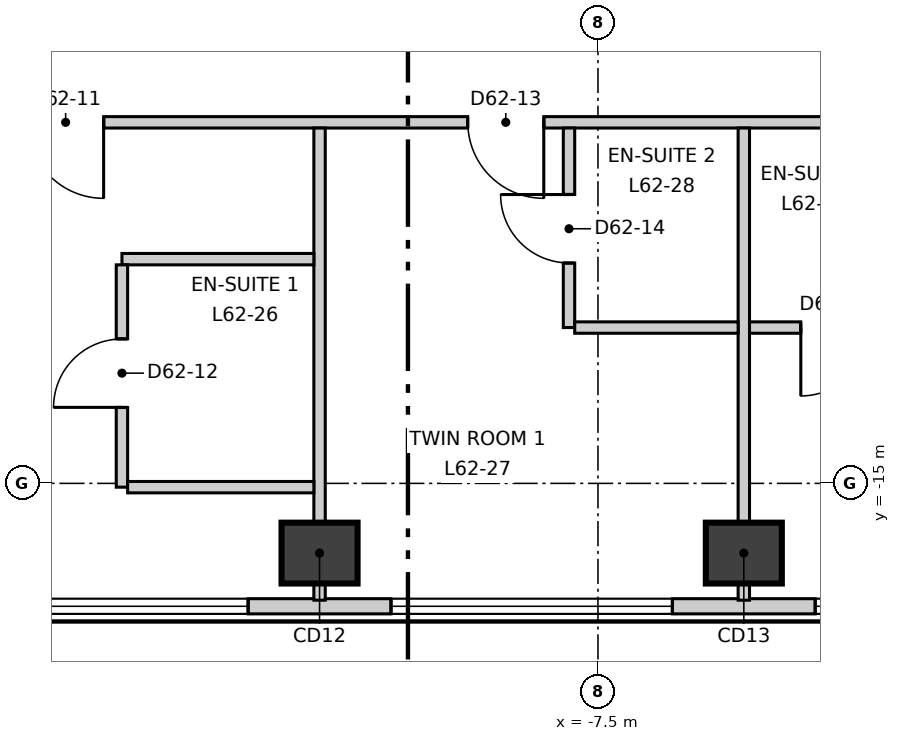
"""IFC4 building model, lengths in metres.
Left out: names, types, materials, properties, quantities, classifications, styles, units other than length and angle.
Written with IfcOpenShell. Run it as: python <this file> out.ifc"""

import sys

from ifc_helpers import new_model, si_unit, direction, frame, frame_2d, origin, origin_2d, place, context, subcontext, project, spatial, rectangle, extrude, element, fill, save


model = new_model("IFC4")
c1 = context("Model", 3, precision=1e-05, world=origin(), true_north=direction((0.0, 1.0)))
c2 = subcontext(c1, "Body", "Model", "MODEL_VIEW")
j1 = project(units=[si_unit("LENGTHUNIT", "METRE"), si_unit("PLANEANGLEUNIT", "RADIAN")], contexts=[c1])
p1 = place(None, origin())
s1 = spatial("IfcSite", under=j1, at=p1, CompositionType="ELEMENT")
p2 = place(p1, origin())
s2 = spatial("IfcBuilding", under=s1, at=p2, CompositionType="ELEMENT")
p3 = place(p2, frame((0.0, 0.0, 268.3)))
s3 = spatial("IfcBuildingStorey", under=s2, at=p3, CompositionType="ELEMENT", Elevation=268.3)
for number, where, z_axis, x_axis in (
    (1, (-11.163, -15.917, -0.3), (0.0, 0.0, 1.0), (1.0, 0.0, 0.0)),
    (2, (-5.581, -15.917, -0.3), (0.0, 0.0, 1.0), (1.0, 0.0, 0.0)),
):
    element("IfcColumn", number, at=place(p3, frame(where, z_axis=z_axis, x_axis=x_axis)), inside=s3, PredefinedType="COLUMN", context=c2, shape_type="SweptSolid", body=[
        extrude(rectangle(XDim=1.0, YDim=0.8, at=origin_2d()), origin(), (0.0, 0.0, 1.0), 3.6),
    ])
p4 = place(p3, frame((-2.577, 28.771, 0.0), z_axis=(0.0, 0.0, 1.0), x_axis=(-0.49999909388, -0.866025926932, 0.0)))
e3 = element("IfcWall", 3, at=p4, inside=s3, PredefinedType="ELEMENTEDWALL", context=c2, shape_type="SweptSolid", body=[
    extrude(rectangle(XDim=47.236, YDim=0.2, at=frame_2d((23.618, 0.0))), origin(), (0.0, 0.0, 1.0), 3.3),
])
p5 = place(p4, frame((2.243, 0.0, 0.9)))
e4 = element("IfcOpeningElement", 4, at=p5, cuts=e3, PredefinedType="OPENING", context=c2, shape_type="SweptSolid", body=[
    extrude(rectangle(XDim=3.7, YDim=2.2, at=frame_2d((1.85, 1.1))), frame((0.0, 0.11, 0.0), z_axis=(0.0, -1.0, 0.0), x_axis=(1.0, 0.0, 0.0)), (0.0, 0.0, 1.0), 0.22),
])
p6 = place(p4, frame((7.824, 0.0, 0.9)))
e5 = element("IfcOpeningElement", 5, at=p6, cuts=e3, PredefinedType="OPENING", context=c2, shape_type="SweptSolid", body=[
    extrude(rectangle(XDim=3.7, YDim=2.2, at=frame_2d((1.85, 1.1))), frame((0.0, 0.11, 0.0), z_axis=(0.0, -1.0, 0.0), x_axis=(1.0, 0.0, 0.0)), (0.0, 0.0, 1.0), 0.22),
])
p7 = place(p4, frame((13.406, 0.0, 0.9)))
e6 = element("IfcOpeningElement", 6, at=p7, cuts=e3, PredefinedType="OPENING", context=c2, shape_type="SweptSolid", body=[
    extrude(rectangle(XDim=3.7, YDim=2.2, at=frame_2d((1.85, 1.1))), frame((0.0, 0.11, 0.0), z_axis=(0.0, -1.0, 0.0), x_axis=(1.0, 0.0, 0.0)), (0.0, 0.0, 1.0), 0.22),
])
p8 = place(p4, frame((18.987, 0.0, 0.9)))
e7 = element("IfcOpeningElement", 7, at=p8, cuts=e3, PredefinedType="OPENING", context=c2, shape_type="SweptSolid", body=[
    extrude(rectangle(XDim=3.7, YDim=2.2, at=frame_2d((1.85, 1.1))), frame((0.0, 0.11, 0.0), z_axis=(0.0, -1.0, 0.0), x_axis=(1.0, 0.0, 0.0)), (0.0, 0.0, 1.0), 0.22),
])
p9 = place(p4, frame((24.569, 0.0, 0.9)))
e8 = element("IfcOpeningElement", 8, at=p9, cuts=e3, PredefinedType="OPENING", context=c2, shape_type="SweptSolid", body=[
    extrude(rectangle(XDim=3.7, YDim=2.2, at=frame_2d((1.85, 1.1))), frame((0.0, 0.11, 0.0), z_axis=(0.0, -1.0, 0.0), x_axis=(1.0, 0.0, 0.0)), (0.0, 0.0, 1.0), 0.22),
])
p10 = place(p4, frame((30.15, 0.0, 0.9)))
e9 = element("IfcOpeningElement", 9, at=p10, cuts=e3, PredefinedType="OPENING", context=c2, shape_type="SweptSolid", body=[
    extrude(rectangle(XDim=3.7, YDim=2.2, at=frame_2d((1.85, 1.1))), frame((0.0, 0.11, 0.0), z_axis=(0.0, -1.0, 0.0), x_axis=(1.0, 0.0, 0.0)), (0.0, 0.0, 1.0), 0.22),
])
p11 = place(p4, frame((35.731, 0.0, 0.9)))
e10 = element("IfcOpeningElement", 10, at=p11, cuts=e3, PredefinedType="OPENING", context=c2, shape_type="SweptSolid", body=[
    extrude(rectangle(XDim=3.7, YDim=2.2, at=frame_2d((1.85, 1.1))), frame((0.0, 0.11, 0.0), z_axis=(0.0, -1.0, 0.0), x_axis=(1.0, 0.0, 0.0)), (0.0, 0.0, 1.0), 0.22),
])
p12 = place(p4, frame((41.313, 0.0, 0.9)))
e11 = element("IfcOpeningElement", 11, at=p12, cuts=e3, PredefinedType="OPENING", context=c2, shape_type="SweptSolid", body=[
    extrude(rectangle(XDim=3.7, YDim=2.2, at=frame_2d((1.85, 1.1))), frame((0.0, 0.11, 0.0), z_axis=(0.0, -1.0, 0.0), x_axis=(1.0, 0.0, 0.0)), (0.0, 0.0, 1.0), 0.22),
])
p13 = place(p3, frame((-23.629, -16.617, 0.0), z_axis=(0.0, 0.0, 1.0), x_axis=(1.0, 0.0, 0.0)))
e12 = element("IfcWall", 12, at=p13, inside=s3, PredefinedType="ELEMENTEDWALL", context=c2, shape_type="SweptSolid", body=[
    extrude(rectangle(XDim=47.238, YDim=0.2, at=frame_2d((23.619, 0.0))), origin(), (0.0, 0.0, 1.0), 3.3),
])
p14 = place(p13, frame((2.244, 0.0, 0.9)))
e13 = element("IfcOpeningElement", 13, at=p14, cuts=e12, PredefinedType="OPENING", context=c2, shape_type="SweptSolid", body=[
    extrude(rectangle(XDim=3.7, YDim=2.2, at=frame_2d((1.85, 1.1))), frame((0.0, 0.11, 0.0), z_axis=(0.0, -1.0, 0.0), x_axis=(1.0, 0.0, 0.0)), (0.0, 0.0, 1.0), 0.22),
])
p15 = place(p13, frame((7.825, 0.0, 0.9)))
e14 = element("IfcOpeningElement", 14, at=p15, cuts=e12, PredefinedType="OPENING", context=c2, shape_type="SweptSolid", body=[
    extrude(rectangle(XDim=3.7, YDim=2.2, at=frame_2d((1.85, 1.1))), frame((0.0, 0.11, 0.0), z_axis=(0.0, -1.0, 0.0), x_axis=(1.0, 0.0, 0.0)), (0.0, 0.0, 1.0), 0.22),
])
p16 = place(p13, frame((13.407, 0.0, 0.9)))
e15 = element("IfcOpeningElement", 15, at=p16, cuts=e12, PredefinedType="OPENING", context=c2, shape_type="SweptSolid", body=[
    extrude(rectangle(XDim=3.7, YDim=2.2, at=frame_2d((1.85, 1.1))), frame((0.0, 0.11, 0.0), z_axis=(0.0, -1.0, 0.0), x_axis=(1.0, 0.0, 0.0)), (0.0, 0.0, 1.0), 0.22),
])
p17 = place(p13, frame((18.988, 0.0, 0.9)))
e16 = element("IfcOpeningElement", 16, at=p17, cuts=e12, PredefinedType="OPENING", context=c2, shape_type="SweptSolid", body=[
    extrude(rectangle(XDim=3.7, YDim=2.2, at=frame_2d((1.85, 1.1))), frame((0.0, 0.11, 0.0), z_axis=(0.0, -1.0, 0.0), x_axis=(1.0, 0.0, 0.0)), (0.0, 0.0, 1.0), 0.22),
])
p18 = place(p13, frame((24.57, 0.0, 0.9)))
e17 = element("IfcOpeningElement", 17, at=p18, cuts=e12, PredefinedType="OPENING", context=c2, shape_type="SweptSolid", body=[
    extrude(rectangle(XDim=3.7, YDim=2.2, at=frame_2d((1.85, 1.1))), frame((0.0, 0.11, 0.0), z_axis=(0.0, -1.0, 0.0), x_axis=(1.0, 0.0, 0.0)), (0.0, 0.0, 1.0), 0.22),
])
p19 = place(p13, frame((30.151, 0.0, 0.9)))
e18 = element("IfcOpeningElement", 18, at=p19, cuts=e12, PredefinedType="OPENING", context=c2, shape_type="SweptSolid", body=[
    extrude(rectangle(XDim=3.7, YDim=2.2, at=frame_2d((1.85, 1.1))), frame((0.0, 0.11, 0.0), z_axis=(0.0, -1.0, 0.0), x_axis=(1.0, 0.0, 0.0)), (0.0, 0.0, 1.0), 0.22),
])
p20 = place(p13, frame((35.733, 0.0, 0.9)))
e19 = element("IfcOpeningElement", 19, at=p20, cuts=e12, PredefinedType="OPENING", context=c2, shape_type="SweptSolid", body=[
    extrude(rectangle(XDim=3.7, YDim=2.2, at=frame_2d((1.85, 1.1))), frame((0.0, 0.11, 0.0), z_axis=(0.0, -1.0, 0.0), x_axis=(1.0, 0.0, 0.0)), (0.0, 0.0, 1.0), 0.22),
])
p21 = place(p13, frame((41.314, 0.0, 0.9)))
e20 = element("IfcOpeningElement", 20, at=p21, cuts=e12, PredefinedType="OPENING", context=c2, shape_type="SweptSolid", body=[
    extrude(rectangle(XDim=3.7, YDim=2.2, at=frame_2d((1.85, 1.1))), frame((0.0, 0.11, 0.0), z_axis=(0.0, -1.0, 0.0), x_axis=(1.0, 0.0, 0.0)), (0.0, 0.0, 1.0), 0.22),
])
p22 = place(p3, frame((-17.678, -10.12, 0.0), z_axis=(0.0, 0.0, 1.0), x_axis=(0.49998824015, 0.86603219323, 0.0)))
e21 = element("IfcWall", 21, at=p22, inside=s3, PredefinedType="PARTITIONING", context=c2, shape_type="SweptSolid", body=[
    extrude(rectangle(XDim=35.357, YDim=0.15, at=frame_2d((17.678, 0.0))), origin(), (0.0, 0.0, 1.0), 3.3),
])
p23 = place(p22, frame((31.607, 0.0, 0.0)))
e22 = element("IfcOpeningElement", 22, at=p23, cuts=e21, PredefinedType="OPENING", context=c2, shape_type="SweptSolid", body=[
    extrude(rectangle(XDim=1.0, YDim=2.1, at=frame_2d((0.5, 1.05))), frame((0.0, 0.085, 0.0), z_axis=(0.0, -1.0, 0.0), x_axis=(1.0, 0.0, 0.0)), (0.0, 0.0, 1.0), 0.17),
])
p24 = place(p22, frame((19.416, 0.0, 0.0)))
e23 = element("IfcOpeningElement", 23, at=p24, cuts=e21, PredefinedType="OPENING", context=c2, shape_type="SweptSolid", body=[
    extrude(rectangle(XDim=1.0, YDim=2.1, at=frame_2d((0.5, 1.05))), frame((0.0, 0.085, 0.0), z_axis=(0.0, -1.0, 0.0), x_axis=(1.0, 0.0, 0.0)), (0.0, 0.0, 1.0), 0.17),
])
p25 = place(p22, frame((24.916, 0.0, 0.0)))
e24 = element("IfcOpeningElement", 24, at=p25, cuts=e21, PredefinedType="OPENING", context=c2, shape_type="SweptSolid", body=[
    extrude(rectangle(XDim=0.9, YDim=2.1, at=frame_2d((0.45, 1.05))), frame((0.0, 0.085, 0.0), z_axis=(0.0, -1.0, 0.0), x_axis=(1.0, 0.0, 0.0)), (0.0, 0.0, 1.0), 0.17),
])
p26 = place(p22, frame((22.816, 0.0, 0.0)))
e25 = element("IfcOpeningElement", 25, at=p26, cuts=e21, PredefinedType="OPENING", context=c2, shape_type="SweptSolid", body=[
    extrude(rectangle(XDim=0.9, YDim=2.1, at=frame_2d((0.45, 1.05))), frame((0.0, 0.085, 0.0), z_axis=(0.0, -1.0, 0.0), x_axis=(1.0, 0.0, 0.0)), (0.0, 0.0, 1.0), 0.17),
])
p27 = place(p22, frame((14.654, 0.0, 0.0)))
e26 = element("IfcOpeningElement", 26, at=p27, cuts=e21, PredefinedType="OPENING", context=c2, shape_type="SweptSolid", body=[
    extrude(rectangle(XDim=1.0, YDim=2.1, at=frame_2d((0.5, 1.05))), frame((0.0, 0.085, 0.0), z_axis=(0.0, -1.0, 0.0), x_axis=(1.0, 0.0, 0.0)), (0.0, 0.0, 1.0), 0.17),
])
p28 = place(p22, frame((7.672, 0.0, 0.0)))
e27 = element("IfcOpeningElement", 27, at=p28, cuts=e21, PredefinedType="OPENING", context=c2, shape_type="SweptSolid", body=[
    extrude(rectangle(XDim=1.0, YDim=2.1, at=frame_2d((0.5, 1.05))), frame((0.0, 0.085, 0.0), z_axis=(0.0, -1.0, 0.0), x_axis=(1.0, 0.0, 0.0)), (0.0, 0.0, 1.0), 0.17),
])
p29 = place(p22, frame((2.69, 0.0, 0.0)))
e28 = element("IfcOpeningElement", 28, at=p29, cuts=e21, PredefinedType="OPENING", context=c2, shape_type="SweptSolid", body=[
    extrude(rectangle(XDim=1.0, YDim=2.1, at=frame_2d((0.5, 1.05))), frame((0.0, 0.085, 0.0), z_axis=(0.0, -1.0, 0.0), x_axis=(1.0, 0.0, 0.0)), (0.0, 0.0, 1.0), 0.17),
])
p30 = place(p3, frame((-17.604, -10.25, 0.0), z_axis=(0.0, 0.0, 1.0), x_axis=(1.0, 0.0, 0.0)))
e29 = element("IfcWall", 29, at=p30, inside=s3, PredefinedType="PARTITIONING", context=c2, shape_type="SweptSolid", body=[
    extrude(rectangle(XDim=35.358, YDim=0.15, at=frame_2d((17.679, 0.0))), origin(), (0.0, 0.0, 1.0), 3.3),
])
p31 = place(p30, frame((2.6, 0.0, 0.0)))
e30 = element("IfcOpeningElement", 30, at=p31, cuts=e29, PredefinedType="OPENING", context=c2, shape_type="SweptSolid", body=[
    extrude(rectangle(XDim=1.0, YDim=2.1, at=frame_2d((0.5, 1.05))), frame((0.0, 0.085, 0.0), z_axis=(0.0, -1.0, 0.0), x_axis=(1.0, 0.0, 0.0)), (0.0, 0.0, 1.0), 0.17),
])
p32 = place(p30, frame((8.391, 0.0, 0.0)))
e31 = element("IfcOpeningElement", 31, at=p32, cuts=e29, PredefinedType="OPENING", context=c2, shape_type="SweptSolid", body=[
    extrude(rectangle(XDim=1.0, YDim=2.1, at=frame_2d((0.5, 1.05))), frame((0.0, 0.085, 0.0), z_axis=(0.0, -1.0, 0.0), x_axis=(1.0, 0.0, 0.0)), (0.0, 0.0, 1.0), 0.17),
])
p33 = place(p30, frame((20.473, 0.0, 0.0)))
e32 = element("IfcOpeningElement", 32, at=p33, cuts=e29, PredefinedType="OPENING", context=c2, shape_type="SweptSolid", body=[
    extrude(rectangle(XDim=1.0, YDim=2.1, at=frame_2d((0.5, 1.05))), frame((0.0, 0.085, 0.0), z_axis=(0.0, -1.0, 0.0), x_axis=(1.0, 0.0, 0.0)), (0.0, 0.0, 1.0), 0.17),
])
p34 = place(p30, frame((14.973, 0.0, 0.0)))
e33 = element("IfcOpeningElement", 33, at=p34, cuts=e29, PredefinedType="OPENING", context=c2, shape_type="SweptSolid", body=[
    extrude(rectangle(XDim=0.9, YDim=2.1, at=frame_2d((0.45, 1.05))), frame((0.0, 0.085, 0.0), z_axis=(0.0, -1.0, 0.0), x_axis=(1.0, 0.0, 0.0)), (0.0, 0.0, 1.0), 0.17),
])
p35 = place(p30, frame((17.173, 0.0, 0.0)))
e34 = element("IfcOpeningElement", 34, at=p35, cuts=e29, PredefinedType="OPENING", context=c2, shape_type="SweptSolid", body=[
    extrude(rectangle(XDim=0.9, YDim=2.1, at=frame_2d((0.45, 1.05))), frame((0.0, 0.085, 0.0), z_axis=(0.0, -1.0, 0.0), x_axis=(1.0, 0.0, 0.0)), (0.0, 0.0, 1.0), 0.17),
])
p36 = place(p30, frame((28.735, 0.0, 0.0)))
e35 = element("IfcOpeningElement", 35, at=p36, cuts=e29, PredefinedType="OPENING", context=c2, shape_type="SweptSolid", body=[
    extrude(rectangle(XDim=1.0, YDim=2.1, at=frame_2d((0.5, 1.05))), frame((0.0, 0.085, 0.0), z_axis=(0.0, -1.0, 0.0), x_axis=(1.0, 0.0, 0.0)), (0.0, 0.0, 1.0), 0.17),
])
for number, where, z_axis, x_axis in (
    (36, (-11.163, -16.537, 0.0), (0.0, 0.0, 1.0), (0.0, 1.0, 0.0)),
    (37, (-5.581, -16.537, 0.0), (0.0, 0.0, 1.0), (0.0, 1.0, 0.0)),
):
    element("IfcWall", number, at=place(p3, frame(where, z_axis=z_axis, x_axis=x_axis)), inside=s3, PredefinedType="PARTITIONING", context=c2, shape_type="SweptSolid", body=[
        extrude(rectangle(XDim=6.212, YDim=0.15, at=frame_2d((3.106, 0.0))), origin(), (0.0, 0.0, 1.0), 3.3),
    ])
p37 = place(p3, frame((-13.763, -12.05, 0.0), z_axis=(0.0, 0.0, 1.0), x_axis=(1.0, 0.0, 0.0)))
e38 = element("IfcWall", 38, at=p37, inside=s3, PredefinedType="PARTITIONING", context=c2, shape_type="SweptSolid", body=[
    extrude(rectangle(XDim=2.525, YDim=0.15, at=frame_2d((1.262, 0.0))), origin(), (0.0, 0.0, 1.0), 3.3),
])
p38 = place(p3, frame((-13.763, -15.05, 0.0), z_axis=(0.0, 0.0, 1.0), x_axis=(0.0, 1.0, 0.0)))
e39 = element("IfcWall", 39, at=p38, inside=s3, PredefinedType="PARTITIONING", context=c2, shape_type="SweptSolid", body=[
    extrude(rectangle(XDim=2.925, YDim=0.15, at=frame_2d((1.462, 0.0))), origin(), (0.0, 0.0, 1.0), 3.3),
])
p39 = place(p38, frame((1.05, 0.0, 0.0)))
e40 = element("IfcOpeningElement", 40, at=p39, cuts=e39, PredefinedType="OPENING", context=c2, shape_type="SweptSolid", body=[
    extrude(rectangle(XDim=0.9, YDim=2.1, at=frame_2d((0.45, 1.05))), frame((0.0, 0.085, 0.0), z_axis=(0.0, -1.0, 0.0), x_axis=(1.0, 0.0, 0.0)), (0.0, 0.0, 1.0), 0.17),
])
p40 = place(p3, frame((-13.688, -15.05, 0.0), z_axis=(0.0, 0.0, 1.0), x_axis=(1.0, 0.0, 0.0)))
e41 = element("IfcWall", 41, at=p40, inside=s3, PredefinedType="PARTITIONING", context=c2, shape_type="SweptSolid", body=[
    extrude(rectangle(XDim=2.45, YDim=0.15, at=frame_2d((1.225, 0.0))), origin(), (0.0, 0.0, 1.0), 3.3),
])
p41 = place(p3, frame((-7.881, -12.95, 0.0), z_axis=(0.0, 0.0, 1.0), x_axis=(0.0, 1.0, 0.0)))
e42 = element("IfcWall", 42, at=p41, inside=s3, PredefinedType="PARTITIONING", context=c2, shape_type="SweptSolid", body=[
    extrude(rectangle(XDim=2.625, YDim=0.15, at=frame_2d((1.312, 0.0))), origin(), (0.0, 0.0, 1.0), 3.3),
])
p42 = place(p41, frame((0.85, 0.0, 0.0)))
e43 = element("IfcOpeningElement", 43, at=p42, cuts=e42, PredefinedType="OPENING", context=c2, shape_type="SweptSolid", body=[
    extrude(rectangle(XDim=0.9, YDim=2.1, at=frame_2d((0.45, 1.05))), frame((0.0, 0.085, 0.0), z_axis=(0.0, -1.0, 0.0), x_axis=(1.0, 0.0, 0.0)), (0.0, 0.0, 1.0), 0.17),
])
p43 = place(p3, frame((-7.806, -12.95, 0.0), z_axis=(0.0, 0.0, 1.0), x_axis=(1.0, 0.0, 0.0)))
e44 = element("IfcWall", 44, at=p43, inside=s3, PredefinedType="PARTITIONING", context=c2, shape_type="SweptSolid", body=[
    extrude(rectangle(XDim=2.15, YDim=0.15, at=frame_2d((1.075, 0.0))), origin(), (0.0, 0.0, 1.0), 3.3),
])
p44 = place(p3, frame((-5.506, -12.95, 0.0), z_axis=(0.0, 0.0, 1.0), x_axis=(1.0, 0.0, 0.0)))
e45 = element("IfcWall", 45, at=p44, inside=s3, PredefinedType="PARTITIONING", context=c2, shape_type="SweptSolid", body=[
    extrude(rectangle(XDim=2.15, YDim=0.15, at=frame_2d((1.075, 0.0))), origin(), (0.0, 0.0, 1.0), 3.3),
])
p45 = place(p44, frame((0.675, 0.0, 0.0)))
e46 = element("IfcOpeningElement", 46, at=p45, cuts=e45, PredefinedType="OPENING", context=c2, shape_type="SweptSolid", body=[
    extrude(rectangle(XDim=0.9, YDim=2.1, at=frame_2d((0.45, 1.05))), frame((0.0, 0.085, 0.0), z_axis=(0.0, -1.0, 0.0), x_axis=(1.0, 0.0, 0.0)), (0.0, 0.0, 1.0), 0.17),
])
p46 = place(p15, origin())
e47 = element("IfcWindow", 47, at=p46, inside=s3, PartitioningType="SINGLE_PANEL", PredefinedType="WINDOW", context=c2, shape_type="SweptSolid", body=[
    extrude(rectangle(XDim=3.7, YDim=2.2, at=frame_2d((1.85, 1.1))), frame((0.0, 0.03, 0.0), z_axis=(0.0, -1.0, 0.0), x_axis=(1.0, 0.0, 0.0)), (0.0, 0.0, 1.0), 0.06),
])
fill(e14, e47)
p47 = place(p16, origin())
e48 = element("IfcWindow", 48, at=p47, inside=s3, PartitioningType="SINGLE_PANEL", PredefinedType="WINDOW", context=c2, shape_type="SweptSolid", body=[
    extrude(rectangle(XDim=3.7, YDim=2.2, at=frame_2d((1.85, 1.1))), frame((0.0, 0.03, 0.0), z_axis=(0.0, -1.0, 0.0), x_axis=(1.0, 0.0, 0.0)), (0.0, 0.0, 1.0), 0.06),
])
fill(e15, e48)
p48 = place(p17, origin())
e49 = element("IfcWindow", 49, at=p48, inside=s3, PartitioningType="SINGLE_PANEL", PredefinedType="WINDOW", context=c2, shape_type="SweptSolid", body=[
    extrude(rectangle(XDim=3.7, YDim=2.2, at=frame_2d((1.85, 1.1))), frame((0.0, 0.03, 0.0), z_axis=(0.0, -1.0, 0.0), x_axis=(1.0, 0.0, 0.0)), (0.0, 0.0, 1.0), 0.06),
])
fill(e16, e49)
p49 = place(p31, origin())
e50 = element("IfcDoor", 50, at=p49, inside=s3, OperationType="SINGLE_SWING_RIGHT", PredefinedType="DOOR", context=c2, shape_type="SweptSolid", body=[
    extrude(rectangle(XDim=1.0, YDim=2.1, at=frame_2d((0.5, 1.05))), frame((0.0, 0.025, 0.0), z_axis=(0.0, -1.0, 0.0), x_axis=(1.0, 0.0, 0.0)), (0.0, 0.0, 1.0), 0.05),
])
fill(e30, e50)
p50 = place(p39, origin())
e51 = element("IfcDoor", 51, at=p50, inside=s3, OperationType="SINGLE_SWING_RIGHT", PredefinedType="DOOR", context=c2, shape_type="SweptSolid", body=[
    extrude(rectangle(XDim=0.9, YDim=2.1, at=frame_2d((0.45, 1.05))), frame((0.0, 0.025, 0.0), z_axis=(0.0, -1.0, 0.0), x_axis=(1.0, 0.0, 0.0)), (0.0, 0.0, 1.0), 0.05),
])
fill(e40, e51)
p51 = place(p32, origin())
e52 = element("IfcDoor", 52, at=p51, inside=s3, OperationType="SINGLE_SWING_RIGHT", PredefinedType="DOOR", context=c2, shape_type="SweptSolid", body=[
    extrude(rectangle(XDim=1.0, YDim=2.1, at=frame_2d((0.5, 1.05))), frame((0.0, 0.025, 0.0), z_axis=(0.0, -1.0, 0.0), x_axis=(1.0, 0.0, 0.0)), (0.0, 0.0, 1.0), 0.05),
])
fill(e31, e52)
p52 = place(p42, origin())
e53 = element("IfcDoor", 53, at=p52, inside=s3, OperationType="SINGLE_SWING_LEFT", PredefinedType="DOOR", context=c2, shape_type="SweptSolid", body=[
    extrude(rectangle(XDim=0.9, YDim=2.1, at=frame_2d((0.45, 1.05))), frame((0.0, 0.025, 0.0), z_axis=(0.0, -1.0, 0.0), x_axis=(1.0, 0.0, 0.0)), (0.0, 0.0, 1.0), 0.05),
])
fill(e43, e53)
p53 = place(p45, origin())
e54 = element("IfcDoor", 54, at=p53, inside=s3, OperationType="SINGLE_SWING_LEFT", PredefinedType="DOOR", context=c2, shape_type="SweptSolid", body=[
    extrude(rectangle(XDim=0.9, YDim=2.1, at=frame_2d((0.45, 1.05))), frame((0.0, 0.025, 0.0), z_axis=(0.0, -1.0, 0.0), x_axis=(1.0, 0.0, 0.0)), (0.0, 0.0, 1.0), 0.05),
])
fill(e46, e54)
save(model, sys.argv[1])
